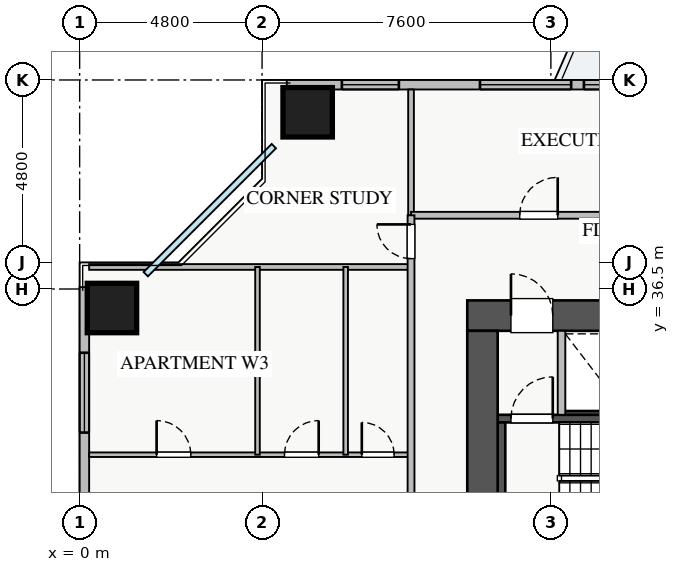
"""IFC4 building model, lengths in metres.
Left out: names, types, materials, properties, quantities, classifications, styles, units other than length and angle.
Written with IfcOpenShell. Run it as: python <this file> out.ifc"""

import sys

from ifc_helpers import new_model, si_unit, direction, frame, frame_2d, origin, origin_2d, place, context, subcontext, project, spatial, rectangle, extrude, source, transform, mapped, element, fill, save


model = new_model("IFC4")
c1 = context("Model", 3, precision=1e-05, world=origin(), true_north=direction((0.0, 1.0)))
c2 = subcontext(c1, "Body", "Model", "MODEL_VIEW")
j1 = project(units=[si_unit("LENGTHUNIT", "METRE"), si_unit("PLANEANGLEUNIT", "RADIAN")], contexts=[c1])
p1 = place(None, origin())
s1 = spatial("IfcSite", under=j1, at=p1, CompositionType="ELEMENT")
p2 = place(p1, origin())
s2 = spatial("IfcBuilding", under=s1, at=p2, CompositionType="ELEMENT")
p3 = place(p2, frame((0.0, 0.0, 39.25)))
s3 = spatial("IfcBuildingStorey", under=s2, at=p3, CompositionType="ELEMENT", Elevation=39.25)
p4 = place(p3, frame((12.68, 33.2, 0.0), z_axis=(0.0, 0.0, 1.0), x_axis=(1.0, 0.0, 0.0)))
e1 = element("IfcWall", 1, at=p4, inside=s3, PredefinedType="SHEAR", context=c2, shape_type="SweptSolid", body=[
    extrude(rectangle(XDim=1.94, YDim=0.18, at=frame_2d((0.97, 0.0))), origin(), (0.0, 0.0, 1.0), 3.07),
])
p5 = place(p3, frame((11.0, 33.09, 0.0), z_axis=(0.0, 0.0, 1.0), x_axis=(1.0, 0.0, 0.0)))
e2 = element("IfcWall", 2, at=p5, inside=s3, PredefinedType="SHEAR", context=c2, shape_type="SweptSolid", body=[
    extrude(rectangle(XDim=7.15, YDim=0.2, at=frame_2d((3.575, 0.0))), origin(), (0.0, 0.0, 1.0), 3.25),
])
p6 = place(p5, frame((0.35, 0.0, 0.0)))
e3 = element("IfcOpeningElement", 3, at=p6, cuts=e2, PredefinedType="OPENING", context=c2, shape_type="SweptSolid", body=[
    extrude(rectangle(XDim=1.1, YDim=2.05, at=frame_2d((0.55, 1.025))), frame((0.0, 0.11, 0.0), z_axis=(0.0, -1.0, 0.0), x_axis=(1.0, 0.0, 0.0)), (0.0, 0.0, 1.0), 0.22),
])
p7 = place(p3, frame((11.1, 30.05, 0.0), z_axis=(0.0, 0.0, 1.0), x_axis=(0.0, 1.0, 0.0)))
e4 = element("IfcWall", 4, at=p7, inside=s3, PredefinedType="SHEAR", context=c2, shape_type="SweptSolid", body=[
    extrude(rectangle(XDim=2.94, YDim=0.2, at=frame_2d((1.47, 0.0))), origin(), (0.0, 0.0, 1.0), 3.25),
])
p8 = place(p3, frame((10.2, 35.8, 0.0), z_axis=(0.0, 0.0, 1.0), x_axis=(1.0, 0.0, 0.0)))
e5 = element("IfcWall", 5, at=p8, inside=s3, PredefinedType="SHEAR", context=c2, shape_type="SweptSolid", body=[
    extrude(rectangle(XDim=17.6, YDim=0.8, at=frame_2d((8.8, 0.0))), origin(), (0.0, 0.0, 1.0), 3.25),
])
p9 = place(p8, frame((1.15, 0.0, 0.0)))
e6 = element("IfcOpeningElement", 6, at=p9, cuts=e5, PredefinedType="OPENING", context=c2, shape_type="SweptSolid", body=[
    extrude(rectangle(XDim=1.1, YDim=2.05, at=frame_2d((0.55, 1.025))), frame((0.0, 0.41, 0.0), z_axis=(0.0, -1.0, 0.0), x_axis=(1.0, 0.0, 0.0)), (0.0, 0.0, 1.0), 0.82),
])
p10 = place(p8, frame((8.3, 0.0, 0.0)))
e7 = element("IfcOpeningElement", 7, at=p10, cuts=e5, PredefinedType="OPENING", context=c2, shape_type="SweptSolid", body=[
    extrude(rectangle(XDim=1.1, YDim=2.05, at=frame_2d((0.55, 1.025))), frame((0.0, 0.41, 0.0), z_axis=(0.0, -1.0, 0.0), x_axis=(1.0, 0.0, 0.0)), (0.0, 0.0, 1.0), 0.82),
])
p11 = place(p8, frame((10.05, 0.0, 0.0)))
e8 = element("IfcOpeningElement", 8, at=p11, cuts=e5, PredefinedType="OPENING", context=c2, shape_type="SweptSolid", body=[
    extrude(rectangle(XDim=1.1, YDim=2.05, at=frame_2d((0.55, 1.025))), frame((0.0, 0.41, 0.0), z_axis=(0.0, -1.0, 0.0), x_axis=(1.0, 0.0, 0.0)), (0.0, 0.0, 1.0), 0.82),
])
p12 = place(p8, frame((14.74, 0.0, 0.0)))
e9 = element("IfcOpeningElement", 9, at=p12, cuts=e5, PredefinedType="OPENING", context=c2, shape_type="SweptSolid", body=[
    extrude(rectangle(XDim=1.0, YDim=2.05, at=frame_2d((0.5, 1.025))), frame((0.0, 0.41, 0.0), z_axis=(0.0, -1.0, 0.0), x_axis=(1.0, 0.0, 0.0)), (0.0, 0.0, 1.0), 0.82),
])
p13 = place(p8, frame((11.835, 0.0, 0.0)))
e10 = element("IfcOpeningElement", 10, at=p13, cuts=e5, PredefinedType="OPENING", context=c2, shape_type="SweptSolid", body=[
    extrude(rectangle(XDim=1.0, YDim=2.05, at=frame_2d((0.5, 1.025))), frame((0.0, 0.41, 0.0), z_axis=(0.0, -1.0, 0.0), x_axis=(1.0, 0.0, 0.0)), (0.0, 0.0, 1.0), 0.82),
])
p14 = place(p8, frame((13.37, 0.0, 0.0)))
e11 = element("IfcOpeningElement", 11, at=p14, cuts=e5, PredefinedType="OPENING", context=c2, shape_type="SweptSolid", body=[
    extrude(rectangle(XDim=1.0, YDim=2.05, at=frame_2d((0.5, 1.025))), frame((0.0, 0.41, 0.0), z_axis=(0.0, -1.0, 0.0), x_axis=(1.0, 0.0, 0.0)), (0.0, 0.0, 1.0), 0.82),
])
p15 = place(p3, frame((10.6, 29.8, 0.0), z_axis=(0.0, 0.0, 1.0), x_axis=(0.0, 1.0, 0.0)))
e12 = element("IfcWall", 12, at=p15, inside=s3, PredefinedType="SHEAR", context=c2, shape_type="SweptSolid", body=[
    extrude(rectangle(XDim=5.6, YDim=0.8, at=frame_2d((2.8, 0.0))), origin(), (0.0, 0.0, 1.0), 3.25),
])
m1 = source(origin(), c2, "Body", "SweptSolid", [
    extrude(rectangle(XDim=1.3, YDim=1.3, at=origin_2d()), origin(), (0.0, 0.0, 1.0), 3.25),
])
for number, where, z_axis, x_axis in (
    (13, (6.0, 41.15, 0.0), (0.0, 0.0, 1.0), (1.0, 0.0, 0.0)),
    (14, (0.85, 36.0, 0.0), (0.0, 0.0, 1.0), (1.0, 0.0, 0.0)),
):
    element("IfcColumn", number, at=place(p3, frame(where, z_axis=z_axis, x_axis=x_axis)), inside=s3, PredefinedType="COLUMN", context=c2, shape_type="MappedRepresentation", body=[
        mapped(m1, transform((0.0, 0.0, 0.0), x_axis=(1.0, 0.0, 0.0), y_axis=(0.0, 1.0, 0.0), z_axis=(0.0, 0.0, 1.0), scale=1.0)),
    ])
p16 = place(p3, frame((5.45, 41.875, 0.0), z_axis=(0.0, 0.0, 1.0), x_axis=(1.0, 0.0, 0.0)))
e15 = element("IfcWall", 15, at=p16, inside=s3, PredefinedType="STANDARD", context=c2, shape_type="SweptSolid", body=[
    extrude(rectangle(XDim=27.1, YDim=0.25, at=frame_2d((13.55, 0.0))), origin(), (0.0, 0.0, 1.0), 2.61),
])
p17 = place(p16, frame((14.4, 0.0, 0.0)))
e16 = element("IfcOpeningElement", 16, at=p17, cuts=e15, PredefinedType="OPENING", context=c2, shape_type="SweptSolid", body=[
    extrude(rectangle(XDim=1.2, YDim=2.1, at=frame_2d((0.6, 1.05))), frame((0.0, 0.135, 0.0), z_axis=(0.0, -1.0, 0.0), x_axis=(1.0, 0.0, 0.0)), (0.0, 0.0, 1.0), 0.27),
])
p18 = place(p16, frame((1.45, 0.0, 0.9)))
e17 = element("IfcOpeningElement", 17, at=p18, cuts=e15, PredefinedType="OPENING", context=c2, shape_type="SweptSolid", body=[
    extrude(rectangle(XDim=1.5, YDim=1.5, at=frame_2d((0.75, 0.75))), frame((0.0, 0.135, 0.0), z_axis=(0.0, -1.0, 0.0), x_axis=(1.0, 0.0, 0.0)), (0.0, 0.0, 1.0), 0.27),
])
p19 = place(p16, frame((7.82, 0.0, 0.9)))
e18 = element("IfcOpeningElement", 18, at=p19, cuts=e15, PredefinedType="OPENING", context=c2, shape_type="SweptSolid", body=[
    extrude(rectangle(XDim=1.8, YDim=1.5, at=frame_2d((0.9, 0.75))), frame((0.0, 0.135, 0.0), z_axis=(0.0, -1.0, 0.0), x_axis=(1.0, 0.0, 0.0)), (0.0, 0.0, 1.0), 0.27),
])
p20 = place(p16, frame((17.92, 0.0, 0.9)))
e19 = element("IfcOpeningElement", 19, at=p20, cuts=e15, PredefinedType="OPENING", context=c2, shape_type="SweptSolid", body=[
    extrude(rectangle(XDim=1.5, YDim=1.5, at=frame_2d((0.75, 0.75))), frame((0.0, 0.135, 0.0), z_axis=(0.0, -1.0, 0.0), x_axis=(1.0, 0.0, 0.0)), (0.0, 0.0, 1.0), 0.27),
])
p21 = place(p16, frame((22.663, 0.0, 0.9)))
e20 = element("IfcOpeningElement", 20, at=p21, cuts=e15, PredefinedType="OPENING", context=c2, shape_type="SweptSolid", body=[
    extrude(rectangle(XDim=2.1, YDim=1.48, at=frame_2d((1.05, 0.74))), frame((0.0, 0.135, 0.0), z_axis=(0.0, -1.0, 0.0), x_axis=(1.0, 0.0, 0.0)), (0.0, 0.0, 1.0), 0.27),
])
p22 = place(p16, frame((5.084, 0.0, 0.9)))
e21 = element("IfcOpeningElement", 21, at=p22, cuts=e15, PredefinedType="OPENING", context=c2, shape_type="SweptSolid", body=[
    extrude(rectangle(XDim=2.4, YDim=1.5, at=frame_2d((1.2, 0.75))), frame((0.0, 0.135, 0.0), z_axis=(0.0, -1.0, 0.0), x_axis=(1.0, 0.0, 0.0)), (0.0, 0.0, 1.0), 0.27),
])
p23 = place(p16, frame((11.002, 0.0, 0.9)))
e22 = element("IfcOpeningElement", 22, at=p23, cuts=e15, PredefinedType="OPENING", context=c2, shape_type="SweptSolid", body=[
    extrude(rectangle(XDim=2.4, YDim=1.5, at=frame_2d((1.2, 0.75))), frame((0.0, 0.135, 0.0), z_axis=(0.0, -1.0, 0.0), x_axis=(1.0, 0.0, 0.0)), (0.0, 0.0, 1.0), 0.27),
])
p24 = place(p3, frame((0.125, 9.45, 0.0), z_axis=(0.0, 0.0, 1.0), x_axis=(0.0, 1.0, 0.0)))
e23 = element("IfcWall", 23, at=p24, inside=s3, PredefinedType="STANDARD", context=c2, shape_type="SweptSolid", body=[
    extrude(rectangle(XDim=27.1, YDim=0.25, at=frame_2d((13.55, 0.0))), origin(), (0.0, 0.0, 1.0), 2.61),
])
p25 = place(p24, frame((14.4, 0.0, 0.0)))
e24 = element("IfcOpeningElement", 24, at=p25, cuts=e23, PredefinedType="OPENING", context=c2, shape_type="SweptSolid", body=[
    extrude(rectangle(XDim=1.2, YDim=2.1, at=frame_2d((0.6, 1.05))), frame((0.0, 0.135, 0.0), z_axis=(0.0, -1.0, 0.0), x_axis=(1.0, 0.0, 0.0)), (0.0, 0.0, 1.0), 0.27),
])
p26 = place(p24, frame((2.188, 0.0, 0.9)))
e25 = element("IfcOpeningElement", 25, at=p26, cuts=e23, PredefinedType="OPENING", context=c2, shape_type="SweptSolid", body=[
    extrude(rectangle(XDim=2.4, YDim=1.48, at=frame_2d((1.2, 0.74))), frame((0.0, 0.135, 0.0), z_axis=(0.0, -1.0, 0.0), x_axis=(1.0, 0.0, 0.0)), (0.0, 0.0, 1.0), 0.27),
])
p27 = place(p24, frame((23.272, 0.0, 0.9)))
e26 = element("IfcOpeningElement", 26, at=p27, cuts=e23, PredefinedType="OPENING", context=c2, shape_type="SweptSolid", body=[
    extrude(rectangle(XDim=2.1, YDim=1.5, at=frame_2d((1.05, 0.75))), frame((0.0, 0.135, 0.0), z_axis=(0.0, -1.0, 0.0), x_axis=(1.0, 0.0, 0.0)), (0.0, 0.0, 1.0), 0.27),
])
p28 = place(p24, frame((13.05, 0.0, 0.9)))
e27 = element("IfcOpeningElement", 27, at=p28, cuts=e23, PredefinedType="OPENING", context=c2, shape_type="SweptSolid", body=[
    extrude(rectangle(XDim=0.9, YDim=1.2, at=frame_2d((0.45, 0.6))), frame((0.0, 0.135, 0.0), z_axis=(0.0, -1.0, 0.0), x_axis=(1.0, 0.0, 0.0)), (0.0, 0.0, 1.0), 0.27),
])
p29 = place(p24, frame((8.165, 0.0, 0.9)))
e28 = element("IfcOpeningElement", 28, at=p29, cuts=e23, PredefinedType="OPENING", context=c2, shape_type="SweptSolid", body=[
    extrude(rectangle(XDim=0.9, YDim=1.2, at=frame_2d((0.45, 0.6))), frame((0.0, 0.135, 0.0), z_axis=(0.0, -1.0, 0.0), x_axis=(1.0, 0.0, 0.0)), (0.0, 0.0, 1.0), 0.27),
])
p30 = place(p24, frame((18.365, 0.0, 0.9)))
e29 = element("IfcOpeningElement", 29, at=p30, cuts=e23, PredefinedType="OPENING", context=c2, shape_type="SweptSolid", body=[
    extrude(rectangle(XDim=0.9, YDim=1.2, at=frame_2d((0.45, 0.6))), frame((0.0, 0.135, 0.0), z_axis=(0.0, -1.0, 0.0), x_axis=(1.0, 0.0, 0.0)), (0.0, 0.0, 1.0), 0.27),
])
p31 = place(p3, frame((12.68, 33.19, 0.0), z_axis=(0.0, 0.0, 1.0), x_axis=(0.0, 1.0, 0.0)))
e30 = element("IfcWall", 30, at=p31, inside=s3, PredefinedType="PARTITIONING", context=c2, shape_type="SweptSolid", body=[
    extrude(rectangle(XDim=2.21, YDim=0.2, at=frame_2d((1.105, 0.0))), origin(), (0.0, 0.0, 1.0), 3.07),
])
p32 = place(p3, frame((8.72, 38.44, 0.0), z_axis=(0.0, 0.0, 1.0), x_axis=(0.0, 1.0, 0.0)))
e31 = element("IfcWall", 31, at=p32, inside=s3, PredefinedType="PARTITIONING", context=c2, shape_type="SweptSolid", body=[
    extrude(rectangle(XDim=3.31, YDim=0.15, at=frame_2d((1.655, 0.0))), origin(), (0.0, 0.0, 1.0), 3.07),
])
p33 = place(p3, frame((8.72, 38.44, 0.0), z_axis=(0.0, 0.0, 1.0), x_axis=(1.0, 0.0, 0.0)))
e32 = element("IfcWall", 32, at=p33, inside=s3, PredefinedType="PARTITIONING", context=c2, shape_type="SweptSolid", body=[
    extrude(rectangle(XDim=23.63, YDim=0.18, at=frame_2d((11.815, 0.0))), origin(), (0.0, 0.0, 1.0), 3.07),
])
p34 = place(p33, frame((2.86, 0.0, 0.0)))
e33 = element("IfcOpeningElement", 33, at=p34, cuts=e32, PredefinedType="OPENING", context=c2, shape_type="SweptSolid", body=[
    extrude(rectangle(XDim=1.0, YDim=2.05, at=frame_2d((0.5, 1.025))), frame((0.0, 0.1, 0.0), z_axis=(0.0, -1.0, 0.0), x_axis=(1.0, 0.0, 0.0)), (0.0, 0.0, 1.0), 0.2),
])
p35 = place(p33, frame((9.4, 0.0, 0.0)))
e34 = element("IfcOpeningElement", 34, at=p35, cuts=e32, PredefinedType="OPENING", context=c2, shape_type="SweptSolid", body=[
    extrude(rectangle(XDim=1.0, YDim=2.05, at=frame_2d((0.5, 1.025))), frame((0.0, 0.1, 0.0), z_axis=(0.0, -1.0, 0.0), x_axis=(1.0, 0.0, 0.0)), (0.0, 0.0, 1.0), 0.2),
])
p36 = place(p33, frame((14.9, 0.0, 0.0)))
e35 = element("IfcOpeningElement", 35, at=p36, cuts=e32, PredefinedType="OPENING", context=c2, shape_type="SweptSolid", body=[
    extrude(rectangle(XDim=1.0, YDim=2.05, at=frame_2d((0.5, 1.025))), frame((0.0, 0.1, 0.0), z_axis=(0.0, -1.0, 0.0), x_axis=(1.0, 0.0, 0.0)), (0.0, 0.0, 1.0), 0.2),
])
p37 = place(p33, frame((20.175, 0.0, 0.0)))
e36 = element("IfcOpeningElement", 36, at=p37, cuts=e32, PredefinedType="OPENING", context=c2, shape_type="SweptSolid", body=[
    extrude(rectangle(XDim=1.0, YDim=2.05, at=frame_2d((0.5, 1.025))), frame((0.0, 0.1, 0.0), z_axis=(0.0, -1.0, 0.0), x_axis=(1.0, 0.0, 0.0)), (0.0, 0.0, 1.0), 0.2),
])
p38 = place(p3, frame((0.25, 37.08, 0.0), z_axis=(0.0, 0.0, 1.0), x_axis=(1.0, 0.0, 0.0)))
e37 = element("IfcWall", 37, at=p38, inside=s3, PredefinedType="PARTITIONING", context=c2, shape_type="SweptSolid", body=[
    extrude(rectangle(XDim=8.47, YDim=0.15, at=frame_2d((4.235, 0.0))), origin(), (0.0, 0.0, 1.0), 3.07),
])
p39 = place(p3, frame((0.25, 32.14, 0.0), z_axis=(0.0, 0.0, 1.0), x_axis=(1.0, 0.0, 0.0)))
e38 = element("IfcWall", 38, at=p39, inside=s3, PredefinedType="PLUMBINGWALL", context=c2, shape_type="SweptSolid", body=[
    extrude(rectangle(XDim=8.47, YDim=0.12, at=frame_2d((4.235, 0.0))), origin(), (0.0, 0.0, 1.0), 3.07),
])
p40 = place(p39, frame((1.775, 0.0, 0.0)))
e39 = element("IfcOpeningElement", 39, at=p40, cuts=e38, PredefinedType="OPENING", context=c2, shape_type="SweptSolid", body=[
    extrude(rectangle(XDim=0.9, YDim=2.05, at=frame_2d((0.45, 1.025))), frame((0.0, 0.07, 0.0), z_axis=(0.0, -1.0, 0.0), x_axis=(1.0, 0.0, 0.0)), (0.0, 0.0, 1.0), 0.14),
])
p41 = place(p39, frame((5.14, 0.0, 0.0)))
e40 = element("IfcOpeningElement", 40, at=p41, cuts=e38, PredefinedType="OPENING", context=c2, shape_type="SweptSolid", body=[
    extrude(rectangle(XDim=0.9, YDim=2.05, at=frame_2d((0.45, 1.025))), frame((0.0, 0.07, 0.0), z_axis=(0.0, -1.0, 0.0), x_axis=(1.0, 0.0, 0.0)), (0.0, 0.0, 1.0), 0.14),
])
p42 = place(p39, frame((7.175, 0.0, 0.0)))
e41 = element("IfcOpeningElement", 41, at=p42, cuts=e38, PredefinedType="OPENING", context=c2, shape_type="SweptSolid", body=[
    extrude(rectangle(XDim=0.85, YDim=2.05, at=frame_2d((0.425, 1.025))), frame((0.0, 0.07, 0.0), z_axis=(0.0, -1.0, 0.0), x_axis=(1.0, 0.0, 0.0)), (0.0, 0.0, 1.0), 0.14),
])
for number, where, z_axis, x_axis in (
    (42, (4.68, 32.14, 0.0), (0.0, 0.0, 1.0), (0.0, 1.0, 0.0)),
    (43, (7.0, 32.14, 0.0), (0.0, 0.0, 1.0), (0.0, 1.0, 0.0)),
):
    element("IfcWall", number, at=place(p3, frame(where, z_axis=z_axis, x_axis=x_axis)), inside=s3, PredefinedType="PLUMBINGWALL", context=c2, shape_type="SweptSolid", body=[
        extrude(rectangle(XDim=4.94, YDim=0.12, at=frame_2d((2.47, 0.0))), origin(), (0.0, 0.0, 1.0), 3.07),
    ])
p43 = place(p3, frame((8.72, 7.21, 0.0), z_axis=(0.0, 0.0, 1.0), x_axis=(0.0, 1.0, 0.0)))
e44 = element("IfcWall", 44, at=p43, inside=s3, PredefinedType="PARTITIONING", context=c2, shape_type="SweptSolid", body=[
    extrude(rectangle(XDim=31.23, YDim=0.18, at=frame_2d((15.615, 0.0))), origin(), (0.0, 0.0, 1.0), 3.07),
])
p44 = place(p43, frame((30.09, 0.0, 0.0)))
e45 = element("IfcOpeningElement", 45, at=p44, cuts=e44, PredefinedType="OPENING", context=c2, shape_type="SweptSolid", body=[
    extrude(rectangle(XDim=0.9, YDim=2.05, at=frame_2d((0.45, 1.025))), frame((0.0, 0.1, 0.0), z_axis=(0.0, -1.0, 0.0), x_axis=(1.0, 0.0, 0.0)), (0.0, 0.0, 1.0), 0.2),
])
p45 = place(p43, frame((0.24, 0.0, 0.0)))
e46 = element("IfcOpeningElement", 46, at=p45, cuts=e44, PredefinedType="OPENING", context=c2, shape_type="SweptSolid", body=[
    extrude(rectangle(XDim=0.9, YDim=2.05, at=frame_2d((0.45, 1.025))), frame((0.0, 0.1, 0.0), z_axis=(0.0, -1.0, 0.0), x_axis=(1.0, 0.0, 0.0)), (0.0, 0.0, 1.0), 0.2),
])
p46 = place(p43, frame((5.265, 0.0, 0.0)))
e47 = element("IfcOpeningElement", 47, at=p46, cuts=e44, PredefinedType="OPENING", context=c2, shape_type="SweptSolid", body=[
    extrude(rectangle(XDim=1.0, YDim=2.05, at=frame_2d((0.5, 1.025))), frame((0.0, 0.1, 0.0), z_axis=(0.0, -1.0, 0.0), x_axis=(1.0, 0.0, 0.0)), (0.0, 0.0, 1.0), 0.2),
])
p47 = place(p43, frame((11.93, 0.0, 0.0)))
e48 = element("IfcOpeningElement", 48, at=p47, cuts=e44, PredefinedType="OPENING", context=c2, shape_type="SweptSolid", body=[
    extrude(rectangle(XDim=1.0, YDim=2.05, at=frame_2d((0.5, 1.025))), frame((0.0, 0.1, 0.0), z_axis=(0.0, -1.0, 0.0), x_axis=(1.0, 0.0, 0.0)), (0.0, 0.0, 1.0), 0.2),
])
p48 = place(p43, frame((21.96, 0.0, 0.0)))
e49 = element("IfcOpeningElement", 49, at=p48, cuts=e44, PredefinedType="OPENING", context=c2, shape_type="SweptSolid", body=[
    extrude(rectangle(XDim=1.0, YDim=2.05, at=frame_2d((0.5, 1.025))), frame((0.0, 0.1, 0.0), z_axis=(0.0, -1.0, 0.0), x_axis=(1.0, 0.0, 0.0)), (0.0, 0.0, 1.0), 0.2),
])
m2 = source(origin(), c2, "Body", "SweptSolid", [
    extrude(rectangle(XDim=1.5, YDim=1.5, at=frame_2d((0.75, 0.75))), frame((0.0, 0.03, 0.0), z_axis=(0.0, -1.0, 0.0), x_axis=(1.0, 0.0, 0.0)), (0.0, 0.0, 1.0), 0.06),
])
p49 = place(p18, origin())
e50 = element("IfcWindow", 50, at=p49, inside=s3, PartitioningType="TRIPLE_PANEL_VERTICAL", PredefinedType="WINDOW", context=c2, shape_type="MappedRepresentation", body=[
    mapped(m2, transform((0.0, 0.0, 0.0), x_axis=(1.0, 0.0, 0.0), y_axis=(0.0, 1.0, 0.0), z_axis=(0.0, 0.0, 1.0), scale=1.0)),
])
fill(e17, e50)
m3 = source(origin(), c2, "Body", "SweptSolid", [
    extrude(rectangle(XDim=1.8, YDim=1.5, at=frame_2d((0.9, 0.75))), frame((0.0, 0.03, 0.0), z_axis=(0.0, -1.0, 0.0), x_axis=(1.0, 0.0, 0.0)), (0.0, 0.0, 1.0), 0.06),
])
p50 = place(p19, origin())
e51 = element("IfcWindow", 51, at=p50, inside=s3, PartitioningType="DOUBLE_PANEL_VERTICAL", PredefinedType="WINDOW", context=c2, shape_type="MappedRepresentation", body=[
    mapped(m3, transform((0.0, 0.0, 0.0), x_axis=(1.0, 0.0, 0.0), y_axis=(0.0, 1.0, 0.0), z_axis=(0.0, 0.0, 1.0), scale=1.0)),
])
fill(e18, e51)
m4 = source(origin(), c2, "Body", "SweptSolid", [
    extrude(rectangle(XDim=2.1, YDim=1.5, at=frame_2d((1.05, 0.75))), frame((0.0, 0.03, 0.0), z_axis=(0.0, -1.0, 0.0), x_axis=(1.0, 0.0, 0.0)), (0.0, 0.0, 1.0), 0.06),
])
p51 = place(p27, origin())
e52 = element("IfcWindow", 52, at=p51, inside=s3, PartitioningType="TRIPLE_PANEL_VERTICAL", PredefinedType="WINDOW", context=c2, shape_type="MappedRepresentation", body=[
    mapped(m4, transform((0.0, 0.0, 0.0), x_axis=(1.0, 0.0, 0.0), y_axis=(0.0, 1.0, 0.0), z_axis=(0.0, 0.0, 1.0), scale=1.0)),
])
fill(e26, e52)
m5 = source(origin(), c2, "Body", "SweptSolid", [
    extrude(rectangle(XDim=1.1, YDim=2.05, at=frame_2d((0.55, 1.025))), frame((0.0, 0.025, 0.0), z_axis=(0.0, -1.0, 0.0), x_axis=(1.0, 0.0, 0.0)), (0.0, 0.0, 1.0), 0.05),
])
p52 = place(p9, origin())
e53 = element("IfcDoor", 53, at=p52, inside=s3, OperationType="SINGLE_SWING_LEFT", PredefinedType="DOOR", context=c2, shape_type="MappedRepresentation", body=[
    mapped(m5, transform((0.0, 0.0, 0.0), x_axis=(1.0, 0.0, 0.0), y_axis=(0.0, 1.0, 0.0), z_axis=(0.0, 0.0, 1.0), scale=1.0)),
])
fill(e6, e53)
p53 = place(p6, origin())
e54 = element("IfcDoor", 54, at=p53, inside=s3, OperationType="SINGLE_SWING_RIGHT", PredefinedType="DOOR", context=c2, shape_type="MappedRepresentation", body=[
    mapped(m5, transform((0.0, 0.0, 0.0), x_axis=(1.0, 0.0, 0.0), y_axis=(0.0, 1.0, 0.0), z_axis=(0.0, 0.0, 1.0), scale=1.0)),
])
fill(e3, e54)
m6 = source(origin(), c2, "Body", "SweptSolid", [
    extrude(rectangle(XDim=1.0, YDim=2.05, at=frame_2d((0.5, 1.025))), frame((0.0, 0.025, 0.0), z_axis=(0.0, -1.0, 0.0), x_axis=(1.0, 0.0, 0.0)), (0.0, 0.0, 1.0), 0.05),
])
p54 = place(p34, origin())
e55 = element("IfcDoor", 55, at=p54, inside=s3, OperationType="SINGLE_SWING_RIGHT", PredefinedType="DOOR", context=c2, shape_type="MappedRepresentation", body=[
    mapped(m6, transform((0.0, 0.0, 0.0), x_axis=(1.0, 0.0, 0.0), y_axis=(0.0, 1.0, 0.0), z_axis=(0.0, 0.0, 1.0), scale=1.0)),
])
fill(e33, e55)
m7 = source(origin(), c2, "Body", "SweptSolid", [
    extrude(rectangle(XDim=0.9, YDim=2.05, at=frame_2d((0.45, 1.025))), frame((0.0, 0.025, 0.0), z_axis=(0.0, -1.0, 0.0), x_axis=(1.0, 0.0, 0.0)), (0.0, 0.0, 1.0), 0.05),
])
p55 = place(p40, origin())
e56 = element("IfcDoor", 56, at=p55, inside=s3, OperationType="SINGLE_SWING_LEFT", PredefinedType="DOOR", context=c2, shape_type="MappedRepresentation", body=[
    mapped(m7, transform((0.0, 0.0, 0.0), x_axis=(1.0, 0.0, 0.0), y_axis=(0.0, 1.0, 0.0), z_axis=(0.0, 0.0, 1.0), scale=1.0)),
])
fill(e39, e56)
p56 = place(p41, origin())
e57 = element("IfcDoor", 57, at=p56, inside=s3, OperationType="SINGLE_SWING_RIGHT", PredefinedType="DOOR", context=c2, shape_type="MappedRepresentation", body=[
    mapped(m7, transform((0.0, 0.0, 0.0), x_axis=(1.0, 0.0, 0.0), y_axis=(0.0, 1.0, 0.0), z_axis=(0.0, 0.0, 1.0), scale=1.0)),
])
fill(e40, e57)
m8 = source(origin(), c2, "Body", "SweptSolid", [
    extrude(rectangle(XDim=0.85, YDim=2.05, at=frame_2d((0.425, 1.025))), frame((0.0, 0.025, 0.0), z_axis=(0.0, -1.0, 0.0), x_axis=(1.0, 0.0, 0.0)), (0.0, 0.0, 1.0), 0.05),
])
p57 = place(p42, origin())
e58 = element("IfcDoor", 58, at=p57, inside=s3, OperationType="SINGLE_SWING_LEFT", PredefinedType="DOOR", context=c2, shape_type="MappedRepresentation", body=[
    mapped(m8, transform((0.0, 0.0, 0.0), x_axis=(1.0, 0.0, 0.0), y_axis=(0.0, 1.0, 0.0), z_axis=(0.0, 0.0, 1.0), scale=1.0)),
])
fill(e41, e58)
p58 = place(p44, origin())
e59 = element("IfcDoor", 59, at=p58, inside=s3, OperationType="SINGLE_SWING_RIGHT", PredefinedType="DOOR", context=c2, shape_type="MappedRepresentation", body=[
    mapped(m7, transform((0.0, 0.0, 0.0), x_axis=(1.0, 0.0, 0.0), y_axis=(0.0, 1.0, 0.0), z_axis=(0.0, 0.0, 1.0), scale=1.0)),
])
fill(e45, e59)
m9 = source(origin(), c2, "Body", "SweptSolid", [
    extrude(rectangle(XDim=2.4, YDim=1.5, at=frame_2d((1.2, 0.75))), frame((0.0, 0.03, 0.0), z_axis=(0.0, -1.0, 0.0), x_axis=(1.0, 0.0, 0.0)), (0.0, 0.0, 1.0), 0.06),
])
p59 = place(p22, origin())
e60 = element("IfcWindow", 60, at=p59, inside=s3, PartitioningType="TRIPLE_PANEL_VERTICAL", PredefinedType="WINDOW", context=c2, shape_type="MappedRepresentation", body=[
    mapped(m9, transform((0.0, 0.0, 0.0), x_axis=(1.0, 0.0, 0.0), y_axis=(0.0, 1.0, 0.0), z_axis=(0.0, 0.0, 1.0), scale=1.0)),
])
fill(e21, e60)
save(model, sys.argv[1])
